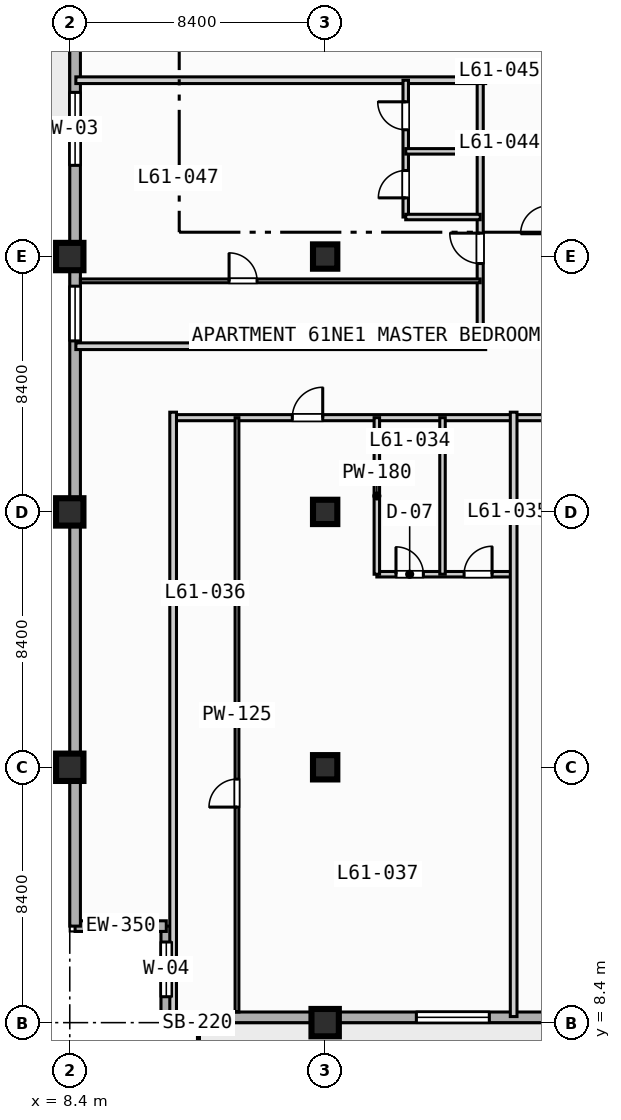
"""IFC4 building model, lengths in metres.
Left out: names, types, materials, properties, quantities, classifications, styles, units other than length and angle.
Written with IfcOpenShell. Run it as: python <this file> out.ifc"""

import sys

from ifc_helpers import new_model, si_unit, direction, frame, frame_2d, origin, origin_2d, place, context, subcontext, project, spatial, rectangle, extrude, element, fill, save


model = new_model("IFC4")
c1 = context("Model", 3, precision=1e-05, world=origin(), true_north=direction((0.0, 1.0)))
c2 = subcontext(c1, "Body", "Model", "MODEL_VIEW")
j1 = project(units=[si_unit("LENGTHUNIT", "METRE"), si_unit("PLANEANGLEUNIT", "RADIAN")], contexts=[c1])
p1 = place(None, origin())
s1 = spatial("IfcSite", under=j1, at=p1, CompositionType="ELEMENT")
p2 = place(p1, origin())
s2 = spatial("IfcBuilding", under=s1, at=p2, CompositionType="ELEMENT")
p3 = place(p2, frame((0.0, 0.0, 249.0)))
s3 = spatial("IfcBuildingStorey", under=s2, at=p3, CompositionType="ELEMENT", Elevation=249.0)
for number, where, z_axis, x_axis in (
    (1, (8.4, 16.8, 0.0), (0.0, 0.0, 1.0), (1.0, 0.0, 0.0)),
    (2, (8.4, 25.2, 0.0), (0.0, 0.0, 1.0), (1.0, 0.0, 0.0)),
    (3, (8.4, 33.6, 0.0), (0.0, 0.0, 1.0), (1.0, 0.0, 0.0)),
    (4, (16.8, 8.4, 0.0), (0.0, 0.0, 1.0), (1.0, 0.0, 0.0)),
):
    element("IfcColumn", number, at=place(p3, frame(where, z_axis=z_axis, x_axis=x_axis)), inside=s3, PredefinedType="COLUMN", context=c2, shape_type="SweptSolid", body=[
        extrude(rectangle(XDim=0.9, YDim=0.9, at=origin_2d()), origin(), (0.0, 0.0, 1.0), 3.7),
    ])
for number, where, z_axis, x_axis in (
    (5, (16.8, 16.8, 0.0), (0.0, 0.0, 1.0), (1.0, 0.0, 0.0)),
    (6, (16.8, 25.2, 0.0), (0.0, 0.0, 1.0), (1.0, 0.0, 0.0)),
    (7, (16.8, 33.6, 0.0), (0.0, 0.0, 1.0), (1.0, 0.0, 0.0)),
):
    element("IfcColumn", number, at=place(p3, frame(where, z_axis=z_axis, x_axis=x_axis)), inside=s3, PredefinedType="COLUMN", context=c2, shape_type="SweptSolid", body=[
        extrude(rectangle(XDim=0.8, YDim=0.8, at=origin_2d()), origin(), (0.0, 0.0, 1.0), 3.7),
    ])
p4 = place(p3, frame((11.575, 8.575, 0.0), z_axis=(0.0, 0.0, 1.0), x_axis=(0.0, 1.0, 0.0)))
e8 = element("IfcWall", 8, at=p4, inside=s3, PredefinedType="STANDARD", context=c2, shape_type="SweptSolid", body=[
    extrude(rectangle(XDim=3.0, YDim=0.35, at=frame_2d((1.5, 0.0))), origin(), (0.0, 0.0, 1.0), 3.47),
])
p5 = place(p4, frame((0.677, 0.0, 0.85)))
e9 = element("IfcOpeningElement", 9, at=p5, cuts=e8, PredefinedType="OPENING", context=c2, shape_type="SweptSolid", body=[
    extrude(rectangle(XDim=1.8, YDim=1.8, at=frame_2d((0.9, 0.9))), frame((0.0, 0.185, 0.0), z_axis=(0.0, -1.0, 0.0), x_axis=(1.0, 0.0, 0.0)), (0.0, 0.0, 1.0), 0.37),
])
p6 = place(p3, frame((11.575, 11.575, 0.0), z_axis=(0.0, 0.0, 1.0), x_axis=(-1.0, 0.0, 0.0)))
e10 = element("IfcWall", 10, at=p6, inside=s3, PredefinedType="STANDARD", context=c2, shape_type="SweptSolid", body=[
    extrude(rectangle(XDim=3.0, YDim=0.35, at=frame_2d((1.5, 0.0))), origin(), (0.0, 0.0, 1.0), 3.47),
])
p7 = place(p3, frame((8.575, 11.575, 0.0), z_axis=(0.0, 0.0, 1.0), x_axis=(0.0, 1.0, 0.0)))
e11 = element("IfcWall", 11, at=p7, inside=s3, PredefinedType="STANDARD", context=c2, shape_type="SweptSolid", body=[
    extrude(rectangle(XDim=60.85, YDim=0.35, at=frame_2d((30.425, 0.0))), origin(), (0.0, 0.0, 1.0), 3.47),
])
p8 = place(p7, frame((33.925, 0.0, 0.0)))
e12 = element("IfcOpeningElement", 12, at=p8, cuts=e11, PredefinedType="OPENING", context=c2, shape_type="SweptSolid", body=[
    extrude(rectangle(XDim=1.4, YDim=2.2, at=frame_2d((0.7, 1.1))), frame((0.0, 0.185, 0.0), z_axis=(0.0, -1.0, 0.0), x_axis=(1.0, 0.0, 0.0)), (0.0, 0.0, 1.0), 0.37),
])
p9 = place(p7, frame((25.025, 0.0, 0.85)))
e13 = element("IfcOpeningElement", 13, at=p9, cuts=e11, PredefinedType="OPENING", context=c2, shape_type="SweptSolid", body=[
    extrude(rectangle(XDim=2.4, YDim=1.95, at=frame_2d((1.2, 0.975))), frame((0.0, 0.185, 0.0), z_axis=(0.0, -1.0, 0.0), x_axis=(1.0, 0.0, 0.0)), (0.0, 0.0, 1.0), 0.37),
])
p10 = place(p7, frame((41.825, 0.0, 0.85)))
e14 = element("IfcOpeningElement", 14, at=p10, cuts=e11, PredefinedType="OPENING", context=c2, shape_type="SweptSolid", body=[
    extrude(rectangle(XDim=2.4, YDim=1.95, at=frame_2d((1.2, 0.975))), frame((0.0, 0.185, 0.0), z_axis=(0.0, -1.0, 0.0), x_axis=(1.0, 0.0, 0.0)), (0.0, 0.0, 1.0), 0.37),
])
p11 = place(p7, frame((19.25, 0.0, 0.85)))
e15 = element("IfcOpeningElement", 15, at=p11, cuts=e11, PredefinedType="OPENING", context=c2, shape_type="SweptSolid", body=[
    extrude(rectangle(XDim=1.8, YDim=1.8, at=frame_2d((0.9, 0.9))), frame((0.0, 0.185, 0.0), z_axis=(0.0, -1.0, 0.0), x_axis=(1.0, 0.0, 0.0)), (0.0, 0.0, 1.0), 0.37),
])
p12 = place(p3, frame((72.425, 8.575, 0.0), z_axis=(0.0, 0.0, 1.0), x_axis=(-1.0, 0.0, 0.0)))
e16 = element("IfcWall", 16, at=p12, inside=s3, PredefinedType="STANDARD", context=c2, shape_type="SweptSolid", body=[
    extrude(rectangle(XDim=60.85, YDim=0.35, at=frame_2d((30.425, 0.0))), origin(), (0.0, 0.0, 1.0), 3.47),
])
p13 = place(p12, frame((42.325, 0.0, 0.0)))
e17 = element("IfcOpeningElement", 17, at=p13, cuts=e16, PredefinedType="OPENING", context=c2, shape_type="SweptSolid", body=[
    extrude(rectangle(XDim=1.4, YDim=2.2, at=frame_2d((0.7, 1.1))), frame((0.0, 0.185, 0.0), z_axis=(0.0, -1.0, 0.0), x_axis=(1.0, 0.0, 0.0)), (0.0, 0.0, 1.0), 0.37),
])
p14 = place(p12, frame((50.225, 0.0, 0.85)))
e18 = element("IfcOpeningElement", 18, at=p14, cuts=e16, PredefinedType="OPENING", context=c2, shape_type="SweptSolid", body=[
    extrude(rectangle(XDim=2.4, YDim=1.95, at=frame_2d((1.2, 0.975))), frame((0.0, 0.185, 0.0), z_axis=(0.0, -1.0, 0.0), x_axis=(1.0, 0.0, 0.0)), (0.0, 0.0, 1.0), 0.37),
])
p15 = place(p12, frame((33.425, 0.0, 0.85)))
e19 = element("IfcOpeningElement", 19, at=p15, cuts=e16, PredefinedType="OPENING", context=c2, shape_type="SweptSolid", body=[
    extrude(rectangle(XDim=2.4, YDim=1.95, at=frame_2d((1.2, 0.975))), frame((0.0, 0.185, 0.0), z_axis=(0.0, -1.0, 0.0), x_axis=(1.0, 0.0, 0.0)), (0.0, 0.0, 1.0), 0.37),
])
p16 = place(p12, frame((25.325, 0.0, 0.85)))
e20 = element("IfcOpeningElement", 20, at=p16, cuts=e16, PredefinedType="OPENING", context=c2, shape_type="SweptSolid", body=[
    extrude(rectangle(XDim=1.8, YDim=1.8, at=frame_2d((0.9, 0.9))), frame((0.0, 0.185, 0.0), z_axis=(0.0, -1.0, 0.0), x_axis=(1.0, 0.0, 0.0)), (0.0, 0.0, 1.0), 0.37),
])
p17 = place(p12, frame((58.675, 0.0, 0.85)))
e21 = element("IfcOpeningElement", 21, at=p17, cuts=e16, PredefinedType="OPENING", context=c2, shape_type="SweptSolid", body=[
    extrude(rectangle(XDim=1.8, YDim=1.8, at=frame_2d((0.9, 0.9))), frame((0.0, 0.185, 0.0), z_axis=(0.0, -1.0, 0.0), x_axis=(1.0, 0.0, 0.0)), (0.0, 0.0, 1.0), 0.37),
])
p18 = place(p3, frame((11.8, 28.3, 0.0), z_axis=(0.0, 0.0, 1.0), x_axis=(1.0, 0.0, 0.0)))
e22 = element("IfcWall", 22, at=p18, inside=s3, PredefinedType="PARTITIONING", context=c2, shape_type="SweptSolid", body=[
    extrude(rectangle(XDim=27.6, YDim=0.2, at=frame_2d((13.8, 0.0))), origin(), (0.0, 0.0, 1.0), 3.47),
])
p19 = place(p18, frame((3.92, 0.0, 0.0)))
e23 = element("IfcOpeningElement", 23, at=p19, cuts=e22, PredefinedType="OPENING", context=c2, shape_type="SweptSolid", body=[
    extrude(rectangle(XDim=1.0, YDim=2.15, at=frame_2d((0.5, 1.075))), frame((0.0, 0.11, 0.0), z_axis=(0.0, -1.0, 0.0), x_axis=(1.0, 0.0, 0.0)), (0.0, 0.0, 1.0), 0.22),
])
p20 = place(p18, frame((12.57, 0.0, 0.0)))
e24 = element("IfcOpeningElement", 24, at=p20, cuts=e22, PredefinedType="OPENING", context=c2, shape_type="SweptSolid", body=[
    extrude(rectangle(XDim=1.0, YDim=2.15, at=frame_2d((0.5, 1.075))), frame((0.0, 0.11, 0.0), z_axis=(0.0, -1.0, 0.0), x_axis=(1.0, 0.0, 0.0)), (0.0, 0.0, 1.0), 0.22),
])
p21 = place(p18, frame((20.77, 0.0, 0.0)))
e25 = element("IfcOpeningElement", 25, at=p21, cuts=e22, PredefinedType="OPENING", context=c2, shape_type="SweptSolid", body=[
    extrude(rectangle(XDim=1.0, YDim=2.15, at=frame_2d((0.5, 1.075))), frame((0.0, 0.11, 0.0), z_axis=(0.0, -1.0, 0.0), x_axis=(1.0, 0.0, 0.0)), (0.0, 0.0, 1.0), 0.22),
])
p22 = place(p3, frame((11.8, 8.6, 0.0), z_axis=(0.0, 0.0, 1.0), x_axis=(0.0, 1.0, 0.0)))
e26 = element("IfcWall", 26, at=p22, inside=s3, PredefinedType="PARTITIONING", context=c2, shape_type="SweptSolid", body=[
    extrude(rectangle(XDim=19.88, YDim=0.22, at=frame_2d((9.94, 0.0))), origin(), (0.0, 0.0, 1.0), 3.47),
])
p23 = place(p3, frame((18.5, 23.15, 0.0), z_axis=(0.0, 0.0, 1.0), x_axis=(1.0, 0.0, 0.0)))
e27 = element("IfcWall", 27, at=p23, inside=s3, PredefinedType="PLUMBINGWALL", context=c2, shape_type="SweptSolid", body=[
    extrude(rectangle(XDim=4.5, YDim=0.18, at=frame_2d((2.25, 0.0))), origin(), (0.0, 0.0, 1.0), 3.47),
])
p24 = place(p23, frame((0.63, 0.0, 0.0)))
e28 = element("IfcOpeningElement", 28, at=p24, cuts=e27, PredefinedType="OPENING", context=c2, shape_type="SweptSolid", body=[
    extrude(rectangle(XDim=0.9, YDim=2.1, at=frame_2d((0.45, 1.05))), frame((0.0, 0.1, 0.0), z_axis=(0.0, -1.0, 0.0), x_axis=(1.0, 0.0, 0.0)), (0.0, 0.0, 1.0), 0.2),
])
p25 = place(p23, frame((2.87, 0.0, 0.0)))
e29 = element("IfcOpeningElement", 29, at=p25, cuts=e27, PredefinedType="OPENING", context=c2, shape_type="SweptSolid", body=[
    extrude(rectangle(XDim=0.92, YDim=2.1, at=frame_2d((0.46, 1.05))), frame((0.0, 0.1, 0.0), z_axis=(0.0, -1.0, 0.0), x_axis=(1.0, 0.0, 0.0)), (0.0, 0.0, 1.0), 0.2),
])
for number, where, z_axis, x_axis in (
    (30, (18.5, 23.15, 0.0), (0.0, 0.0, 1.0), (0.0, 1.0, 0.0)),
    (31, (20.66, 23.15, 0.0), (0.0, 0.0, 1.0), (0.0, 1.0, 0.0)),
):
    element("IfcWall", number, at=place(p3, frame(where, z_axis=z_axis, x_axis=x_axis)), inside=s3, PredefinedType="PLUMBINGWALL", context=c2, shape_type="SweptSolid", body=[
        extrude(rectangle(XDim=5.15, YDim=0.18, at=frame_2d((2.575, 0.0))), origin(), (0.0, 0.0, 1.0), 3.47),
    ])
p26 = place(p3, frame((13.9, 8.75, 0.0), z_axis=(0.0, 0.0, 1.0), x_axis=(0.0, 1.0, 0.0)))
e32 = element("IfcWall", 32, at=p26, inside=s3, PredefinedType="PARTITIONING", context=c2, shape_type="SweptSolid", body=[
    extrude(rectangle(XDim=19.55, YDim=0.125, at=frame_2d((9.775, 0.0))), origin(), (0.0, 0.0, 1.0), 3.47),
])
p27 = place(p26, frame((6.74, 0.0, 0.0)))
e33 = element("IfcOpeningElement", 33, at=p27, cuts=e32, PredefinedType="OPENING", context=c2, shape_type="SweptSolid", body=[
    extrude(rectangle(XDim=0.92, YDim=2.1, at=frame_2d((0.46, 1.05))), frame((0.0, 0.073, 0.0), z_axis=(0.0, -1.0, 0.0), x_axis=(1.0, 0.0, 0.0)), (0.0, 0.0, 1.0), 0.145),
])
p28 = place(p3, frame((23.0, 8.6, 0.0), z_axis=(0.0, 0.0, 1.0), x_axis=(0.0, 1.0, 0.0)))
e34 = element("IfcWall", 34, at=p28, inside=s3, PredefinedType="PARTITIONING", context=c2, shape_type="SweptSolid", body=[
    extrude(rectangle(XDim=19.88, YDim=0.22, at=frame_2d((9.94, 0.0))), origin(), (0.0, 0.0, 1.0), 3.47),
])
p29 = place(p3, frame((21.9, 30.65, 0.0), z_axis=(0.0, 0.0, 1.0), x_axis=(0.0, 1.0, 0.0)))
e35 = element("IfcWall", 35, at=p29, inside=s3, PredefinedType="PARTITIONING", context=c2, shape_type="SweptSolid", body=[
    extrude(rectangle(XDim=8.75, YDim=0.2, at=frame_2d((4.375, 0.0))), origin(), (0.0, 0.0, 1.0), 3.47),
])
p30 = place(p29, frame((2.72, 0.0, 0.0)))
e36 = element("IfcOpeningElement", 36, at=p30, cuts=e35, PredefinedType="OPENING", context=c2, shape_type="SweptSolid", body=[
    extrude(rectangle(XDim=1.0, YDim=2.15, at=frame_2d((0.5, 1.075))), frame((0.0, 0.11, 0.0), z_axis=(0.0, -1.0, 0.0), x_axis=(1.0, 0.0, 0.0)), (0.0, 0.0, 1.0), 0.22),
])
for number, where, z_axis, x_axis in (
    (37, (8.6, 30.65, 0.0), (0.0, 0.0, 1.0), (1.0, 0.0, 0.0)),
    (38, (8.6, 39.4, 0.0), (0.0, 0.0, 1.0), (1.0, 0.0, 0.0)),
):
    element("IfcWall", number, at=place(p3, frame(where, z_axis=z_axis, x_axis=x_axis)), inside=s3, PredefinedType="PARTITIONING", context=c2, shape_type="SweptSolid", body=[
        extrude(rectangle(XDim=13.48, YDim=0.22, at=frame_2d((6.74, 0.0))), origin(), (0.0, 0.0, 1.0), 3.47),
    ])
p31 = place(p3, frame((19.45, 34.9, 0.0), z_axis=(0.0, 0.0, 1.0), x_axis=(0.0, 1.0, 0.0)))
e39 = element("IfcWall", 39, at=p31, inside=s3, PredefinedType="PLUMBINGWALL", context=c2, shape_type="SweptSolid", body=[
    extrude(rectangle(XDim=4.5, YDim=0.18, at=frame_2d((2.25, 0.0))), origin(), (0.0, 0.0, 1.0), 3.47),
])
p32 = place(p31, frame((0.63, 0.0, 0.0)))
e40 = element("IfcOpeningElement", 40, at=p32, cuts=e39, PredefinedType="OPENING", context=c2, shape_type="SweptSolid", body=[
    extrude(rectangle(XDim=0.9, YDim=2.1, at=frame_2d((0.45, 1.05))), frame((0.0, 0.1, 0.0), z_axis=(0.0, -1.0, 0.0), x_axis=(1.0, 0.0, 0.0)), (0.0, 0.0, 1.0), 0.2),
])
p33 = place(p31, frame((2.87, 0.0, 0.0)))
e41 = element("IfcOpeningElement", 41, at=p33, cuts=e39, PredefinedType="OPENING", context=c2, shape_type="SweptSolid", body=[
    extrude(rectangle(XDim=0.92, YDim=2.1, at=frame_2d((0.46, 1.05))), frame((0.0, 0.1, 0.0), z_axis=(0.0, -1.0, 0.0), x_axis=(1.0, 0.0, 0.0)), (0.0, 0.0, 1.0), 0.2),
])
for number, where, z_axis, x_axis in (
    (42, (19.45, 34.9, 0.0), (0.0, 0.0, 1.0), (1.0, 0.0, 0.0)),
    (43, (19.45, 37.06, 0.0), (0.0, 0.0, 1.0), (1.0, 0.0, 0.0)),
):
    element("IfcWall", number, at=place(p3, frame(where, z_axis=z_axis, x_axis=x_axis)), inside=s3, PredefinedType="PLUMBINGWALL", context=c2, shape_type="SweptSolid", body=[
        extrude(rectangle(XDim=2.45, YDim=0.18, at=frame_2d((1.225, 0.0))), origin(), (0.0, 0.0, 1.0), 3.47),
    ])
p34 = place(p3, frame((8.75, 32.8, 0.0), z_axis=(0.0, 0.0, 1.0), x_axis=(1.0, 0.0, 0.0)))
e44 = element("IfcWall", 44, at=p34, inside=s3, PredefinedType="PARTITIONING", context=c2, shape_type="SweptSolid", body=[
    extrude(rectangle(XDim=13.15, YDim=0.125, at=frame_2d((6.575, 0.0))), origin(), (0.0, 0.0, 1.0), 3.47),
])
p35 = place(p34, frame((4.89, 0.0, 0.0)))
e45 = element("IfcOpeningElement", 45, at=p35, cuts=e44, PredefinedType="OPENING", context=c2, shape_type="SweptSolid", body=[
    extrude(rectangle(XDim=0.92, YDim=2.1, at=frame_2d((0.46, 1.05))), frame((0.0, 0.073, 0.0), z_axis=(0.0, -1.0, 0.0), x_axis=(1.0, 0.0, 0.0)), (0.0, 0.0, 1.0), 0.145),
])
p36 = place(p5, origin())
e46 = element("IfcWindow", 46, at=p36, inside=s3, PartitioningType="SINGLE_PANEL", PredefinedType="WINDOW", context=c2, shape_type="SweptSolid", body=[
    extrude(rectangle(XDim=1.8, YDim=1.8, at=frame_2d((0.9, 0.9))), frame((0.0, 0.03, 0.0), z_axis=(0.0, -1.0, 0.0), x_axis=(1.0, 0.0, 0.0)), (0.0, 0.0, 1.0), 0.06),
])
fill(e9, e46)
p37 = place(p9, origin())
e47 = element("IfcWindow", 47, at=p37, inside=s3, PartitioningType="SINGLE_PANEL", PredefinedType="WINDOW", context=c2, shape_type="SweptSolid", body=[
    extrude(rectangle(XDim=2.4, YDim=1.95, at=frame_2d((1.2, 0.975))), frame((0.0, 0.03, 0.0), z_axis=(0.0, -1.0, 0.0), x_axis=(1.0, 0.0, 0.0)), (0.0, 0.0, 1.0), 0.06),
])
fill(e13, e47)
p38 = place(p11, origin())
e48 = element("IfcWindow", 48, at=p38, inside=s3, PartitioningType="SINGLE_PANEL", PredefinedType="WINDOW", context=c2, shape_type="SweptSolid", body=[
    extrude(rectangle(XDim=1.8, YDim=1.8, at=frame_2d((0.9, 0.9))), frame((0.0, 0.03, 0.0), z_axis=(0.0, -1.0, 0.0), x_axis=(1.0, 0.0, 0.0)), (0.0, 0.0, 1.0), 0.06),
])
fill(e15, e48)
p39 = place(p14, origin())
e49 = element("IfcWindow", 49, at=p39, inside=s3, PartitioningType="SINGLE_PANEL", PredefinedType="WINDOW", context=c2, shape_type="SweptSolid", body=[
    extrude(rectangle(XDim=2.4, YDim=1.95, at=frame_2d((1.2, 0.975))), frame((0.0, 0.03, 0.0), z_axis=(0.0, -1.0, 0.0), x_axis=(1.0, 0.0, 0.0)), (0.0, 0.0, 1.0), 0.06),
])
fill(e18, e49)
p40 = place(p17, origin())
e50 = element("IfcWindow", 50, at=p40, inside=s3, PartitioningType="SINGLE_PANEL", PredefinedType="WINDOW", context=c2, shape_type="SweptSolid", body=[
    extrude(rectangle(XDim=1.8, YDim=1.8, at=frame_2d((0.9, 0.9))), frame((0.0, 0.03, 0.0), z_axis=(0.0, -1.0, 0.0), x_axis=(1.0, 0.0, 0.0)), (0.0, 0.0, 1.0), 0.06),
])
fill(e21, e50)
p41 = place(p19, origin())
e51 = element("IfcDoor", 51, at=p41, inside=s3, OperationType="SINGLE_SWING_RIGHT", PredefinedType="DOOR", context=c2, shape_type="SweptSolid", body=[
    extrude(rectangle(XDim=1.0, YDim=2.15, at=frame_2d((0.5, 1.075))), frame((0.0, 0.025, 0.0), z_axis=(0.0, -1.0, 0.0), x_axis=(1.0, 0.0, 0.0)), (0.0, 0.0, 1.0), 0.05),
])
fill(e23, e51)
p42 = place(p24, origin())
e52 = element("IfcDoor", 52, at=p42, inside=s3, OperationType="SINGLE_SWING_LEFT", PredefinedType="DOOR", context=c2, shape_type="SweptSolid", body=[
    extrude(rectangle(XDim=0.9, YDim=2.1, at=frame_2d((0.45, 1.05))), frame((0.0, 0.025, 0.0), z_axis=(0.0, -1.0, 0.0), x_axis=(1.0, 0.0, 0.0)), (0.0, 0.0, 1.0), 0.05),
])
fill(e28, e52)
p43 = place(p25, origin())
e53 = element("IfcDoor", 53, at=p43, inside=s3, OperationType="SINGLE_SWING_RIGHT", PredefinedType="DOOR", context=c2, shape_type="SweptSolid", body=[
    extrude(rectangle(XDim=0.92, YDim=2.1, at=frame_2d((0.46, 1.05))), frame((0.0, 0.025, 0.0), z_axis=(0.0, -1.0, 0.0), x_axis=(1.0, 0.0, 0.0)), (0.0, 0.0, 1.0), 0.05),
])
fill(e29, e53)
p44 = place(p27, origin())
e54 = element("IfcDoor", 54, at=p44, inside=s3, OperationType="SINGLE_SWING_LEFT", PredefinedType="DOOR", context=c2, shape_type="SweptSolid", body=[
    extrude(rectangle(XDim=0.92, YDim=2.1, at=frame_2d((0.46, 1.05))), frame((0.0, 0.025, 0.0), z_axis=(0.0, -1.0, 0.0), x_axis=(1.0, 0.0, 0.0)), (0.0, 0.0, 1.0), 0.05),
])
fill(e33, e54)
p45 = place(p30, origin())
e55 = element("IfcDoor", 55, at=p45, inside=s3, OperationType="SINGLE_SWING_RIGHT", PredefinedType="DOOR", context=c2, shape_type="SweptSolid", body=[
    extrude(rectangle(XDim=1.0, YDim=2.15, at=frame_2d((0.5, 1.075))), frame((0.0, 0.025, 0.0), z_axis=(0.0, -1.0, 0.0), x_axis=(1.0, 0.0, 0.0)), (0.0, 0.0, 1.0), 0.05),
])
fill(e36, e55)
p46 = place(p32, origin())
e56 = element("IfcDoor", 56, at=p46, inside=s3, OperationType="SINGLE_SWING_LEFT", PredefinedType="DOOR", context=c2, shape_type="SweptSolid", body=[
    extrude(rectangle(XDim=0.9, YDim=2.1, at=frame_2d((0.45, 1.05))), frame((0.0, 0.025, 0.0), z_axis=(0.0, -1.0, 0.0), x_axis=(1.0, 0.0, 0.0)), (0.0, 0.0, 1.0), 0.05),
])
fill(e40, e56)
p47 = place(p33, origin())
e57 = element("IfcDoor", 57, at=p47, inside=s3, OperationType="SINGLE_SWING_RIGHT", PredefinedType="DOOR", context=c2, shape_type="SweptSolid", body=[
    extrude(rectangle(XDim=0.92, YDim=2.1, at=frame_2d((0.46, 1.05))), frame((0.0, 0.025, 0.0), z_axis=(0.0, -1.0, 0.0), x_axis=(1.0, 0.0, 0.0)), (0.0, 0.0, 1.0), 0.05),
])
fill(e41, e57)
p48 = place(p35, origin())
e58 = element("IfcDoor", 58, at=p48, inside=s3, OperationType="SINGLE_SWING_LEFT", PredefinedType="DOOR", context=c2, shape_type="SweptSolid", body=[
    extrude(rectangle(XDim=0.92, YDim=2.1, at=frame_2d((0.46, 1.05))), frame((0.0, 0.025, 0.0), z_axis=(0.0, -1.0, 0.0), x_axis=(1.0, 0.0, 0.0)), (0.0, 0.0, 1.0), 0.05),
])
fill(e45, e58)
save(model, sys.argv[1])
